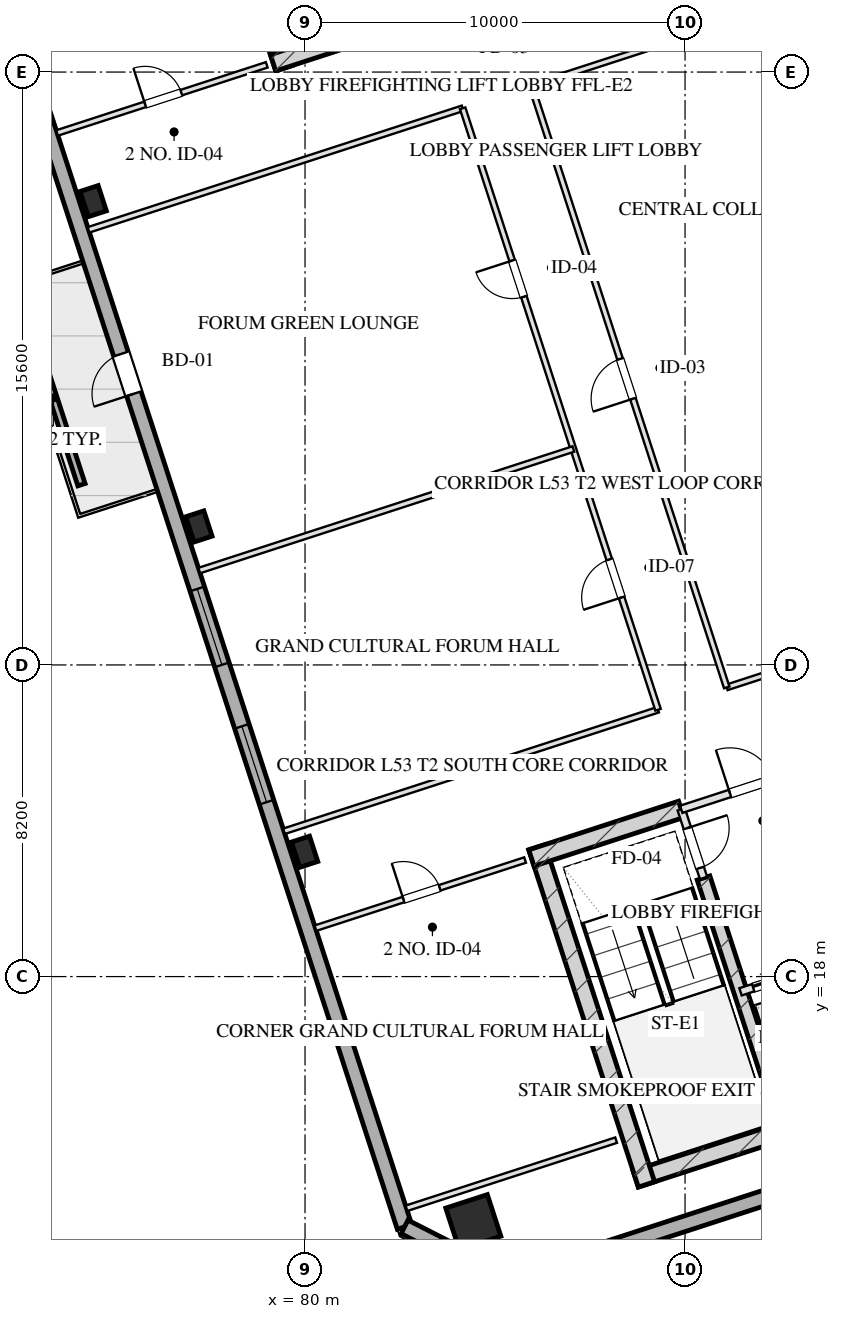
"""IFC4 building model, lengths in metres.
Left out: names, types, materials, properties, quantities, classifications, styles, units other than length and angle.
Written with IfcOpenShell. Run it as: python <this file> out.ifc"""

import sys

from ifc_helpers import new_model, si_unit, direction, frame, frame_2d, origin, origin_2d, place, context, subcontext, project, spatial, rectangle, hollow_rectangle, extrude, element, fill, save


model = new_model("IFC4")
c1 = context("Model", 3, precision=1e-05, world=origin(), true_north=direction((0.0, 1.0)))
c2 = subcontext(c1, "Body", "Model", "MODEL_VIEW")
j1 = project(units=[si_unit("LENGTHUNIT", "METRE"), si_unit("PLANEANGLEUNIT", "RADIAN")], contexts=[c1])
p1 = place(None, origin())
s1 = spatial("IfcSite", under=j1, at=p1, CompositionType="ELEMENT")
p2 = place(p1, origin())
s2 = spatial("IfcBuilding", under=s1, at=p2, CompositionType="ELEMENT")
p3 = place(p2, frame((0.0, 0.0, 198.95)))
s3 = spatial("IfcBuildingStorey", under=s2, at=p3, CompositionType="ELEMENT", Elevation=198.95)
p4 = place(p3, frame((88.701, 12.675, 0.0), z_axis=(0.0, 0.0, 1.0), x_axis=(0.95105824505, 0.309011673763, 0.0)))
e1 = element("IfcWall", 1, at=p4, inside=s3, PredefinedType="SHEAR", context=c2, shape_type="SweptSolid", body=[
    extrude(rectangle(XDim=16.25, YDim=0.45, at=frame_2d((8.125, 0.0))), origin(), (0.0, 0.0, 1.0), 3.45),
])
p5 = place(p3, frame((86.102, 21.404, 0.0), z_axis=(0.0, 0.0, 1.0), x_axis=(0.309035778627, -0.951050412717, 0.0)))
e2 = element("IfcWall", 2, at=p5, inside=s3, PredefinedType="SHEAR", context=c2, shape_type="SweptSolid", body=[
    extrude(rectangle(XDim=9.33, YDim=0.45, at=frame_2d((4.665, 0.0))), origin(), (0.0, 0.0, 1.0), 3.45),
])
p6 = place(p3, frame((90.486, 20.594, 0.0), z_axis=(0.0, 0.0, 1.0), x_axis=(0.309020428229, -0.951055400562, 0.0)))
e3 = element("IfcWall", 3, at=p6, inside=s3, PredefinedType="SHEAR", context=c2, shape_type="SweptSolid", body=[
    extrude(rectangle(XDim=6.98, YDim=0.35, at=frame_2d((3.49, 0.0))), origin(), (0.0, 0.0, 1.0), 3.45),
])
p7 = place(p3, frame((85.957, 21.12, 0.0), z_axis=(0.0, 0.0, 1.0), x_axis=(0.951064796122, 0.308991510526, 0.0)))
e4 = element("IfcWall", 4, at=p7, inside=s3, PredefinedType="SHEAR", context=c2, shape_type="SweptSolid", body=[
    extrude(rectangle(XDim=4.145, YDim=0.45, at=frame_2d((2.073, 0.0))), origin(), (0.0, 0.0, 1.0), 3.45),
])
p8 = place(p3, frame((79.442, 41.899, 0.0), z_axis=(0.0, 0.0, 1.0), x_axis=(-0.309035778627, 0.951050412717, 0.0)))
e5 = element("IfcWall", 5, at=p8, inside=s3, PredefinedType="SHEAR", context=c2, shape_type="SweptSolid", body=[
    extrude(rectangle(XDim=9.33, YDim=0.45, at=frame_2d((4.665, 0.0))), origin(), (0.0, 0.0, 1.0), 3.45),
])
p9 = place(p3, frame((79.159, 42.043, 0.0), z_axis=(0.0, 0.0, 1.0), x_axis=(0.951047485828, 0.309044785913, 0.0)))
e6 = element("IfcWall", 6, at=p9, inside=s3, PredefinedType="SHEAR", context=c2, shape_type="SweptSolid", body=[
    extrude(rectangle(XDim=4.145, YDim=0.45, at=frame_2d((2.073, 0.0))), origin(), (0.0, 0.0, 1.0), 3.45),
])
p10 = place(p3, frame((84.428, 11.539, 0.0), z_axis=(0.0, 0.0, 1.0), x_axis=(0.951056516295, 0.309016994375, 0.0)))
e7 = element("IfcColumn", 7, at=p10, inside=s3, PredefinedType="COLUMN", context=c2, shape_type="SweptSolid", body=[
    extrude(hollow_rectangle(XDim=1.15, YDim=1.15, WallThickness=0.04, at=origin_2d()), origin(), (0.0, 0.0, 1.0), 3.451),
])
for number, where, z_axis, x_axis in (
    (8, (79.99, 21.284, 0.0), (0.0, 0.0, 1.0), (0.951, 0.309, 0.0)),
    (9, (77.208, 29.844, 0.0), (0.0, 0.0, 1.0), (0.951, 0.309, 0.0)),
    (10, (74.427, 38.403, 0.0), (0.0, 0.0, 1.0), (0.951, 0.309, 0.0)),
):
    element("IfcColumn", number, at=place(p3, frame(where, z_axis=z_axis, x_axis=x_axis)), inside=s3, PredefinedType="COLUMN", context=c2, shape_type="SweptSolid", body=[
        extrude(hollow_rectangle(XDim=0.5, YDim=0.7, WallThickness=0.025, at=origin_2d()), origin(), (0.0, 0.0, 1.0), 3.451),
    ])
p11 = place(p3, frame((82.618, 11.414, 0.0), z_axis=(0.0, 0.0, 1.0), x_axis=(-0.309016491071, 0.951056679828, 0.0)))
e11 = element("IfcWall", 11, at=p11, inside=s3, PredefinedType="SOLIDWALL", context=c2, shape_type="SweptSolid", body=[
    extrude(rectangle(XDim=38.4, YDim=0.4, at=frame_2d((19.2, 0.0))), origin(), (0.0, 0.0, 1.0), 2.61),
])
p12 = place(p11, frame((11.75, 0.0, 0.75)))
e12 = element("IfcOpeningElement", 12, at=p12, cuts=e11, PredefinedType="OPENING", context=c2, shape_type="SweptSolid", body=[
    extrude(rectangle(XDim=2.1, YDim=1.46, at=frame_2d((1.05, 0.73))), frame((0.0, 0.21, 0.0), z_axis=(0.0, -1.0, 0.0), x_axis=(1.0, 0.0, 0.0)), (0.0, 0.0, 1.0), 0.42),
])
p13 = place(p11, frame((15.55, 0.0, 0.75)))
e13 = element("IfcOpeningElement", 13, at=p13, cuts=e11, PredefinedType="OPENING", context=c2, shape_type="SweptSolid", body=[
    extrude(rectangle(XDim=2.1, YDim=1.46, at=frame_2d((1.05, 0.73))), frame((0.0, 0.21, 0.0), z_axis=(0.0, -1.0, 0.0), x_axis=(1.0, 0.0, 0.0)), (0.0, 0.0, 1.0), 0.42),
])
p14 = place(p11, frame((23.05, 0.0, 0.0)))
e14 = element("IfcOpeningElement", 14, at=p14, cuts=e11, PredefinedType="OPENING", context=c2, shape_type="SweptSolid", body=[
    extrude(rectangle(XDim=1.1, YDim=2.15, at=frame_2d((0.55, 1.075))), frame((0.0, 0.21, 0.0), z_axis=(0.0, -1.0, 0.0), x_axis=(1.0, 0.0, 0.0)), (0.0, 0.0, 1.0), 0.42),
])
p15 = place(p3, frame((107.835, 17.294, 0.0), z_axis=(0.0, 0.0, 1.0), x_axis=(-0.951058012937, -0.309012388148, 0.0)))
e15 = element("IfcWall", 15, at=p15, inside=s3, PredefinedType="SOLIDWALL", context=c2, shape_type="SweptSolid", body=[
    extrude(rectangle(XDim=23.6, YDim=0.4, at=frame_2d((11.8, 0.0))), origin(), (0.0, 0.0, 1.0), 2.61),
])
p16 = place(p3, frame((85.39, 10.001, 0.0), z_axis=(0.0, 0.0, 1.0), x_axis=(-0.890979603174, 0.454043331334, 0.0)))
e16 = element("IfcWall", 16, at=p16, inside=s3, PredefinedType="SOLIDWALL", context=c2, shape_type="SweptSolid", body=[
    extrude(rectangle(XDim=3.111, YDim=0.4, at=frame_2d((1.556, 0.0))), origin(), (0.0, 0.0, 1.0), 2.61),
])
p17 = place(p3, frame((74.117, 30.942, 0.0), z_axis=(0.0, 0.0, 1.0), x_axis=(-0.308986014439, 0.951066581729, 0.0)))
e17 = element("IfcWall", 17, at=p17, inside=s3, PredefinedType="PARAPET", context=c2, shape_type="SweptSolid", body=[
    extrude(rectangle(XDim=4.8, YDim=0.2, at=frame_2d((2.4, 0.0))), origin(), (0.0, 0.0, 1.0), 0.75),
])
p18 = place(p3, frame((89.899, 22.401, 0.0), z_axis=(0.0, 0.0, 1.0), x_axis=(0.308932062672, -0.951084108086, 0.0)))
e18 = element("IfcWall", 18, at=p18, inside=s3, PredefinedType="PARTITIONING", context=c2, shape_type="SweptSolid", body=[
    extrude(rectangle(XDim=1.9, YDim=0.2, at=frame_2d((0.95, 0.0))), origin(), (0.0, 0.0, 1.0), 3.175),
])
p19 = place(p18, frame((0.52, 0.0, 0.0)))
e19 = element("IfcOpeningElement", 19, at=p19, cuts=e18, PredefinedType="OPENING", context=c2, shape_type="SweptSolid", body=[
    extrude(rectangle(XDim=1.1, YDim=2.05, at=frame_2d((0.55, 1.025))), frame((0.0, 0.11, 0.0), z_axis=(0.0, -1.0, 0.0), x_axis=(1.0, 0.0, 0.0)), (0.0, 0.0, 1.0), 0.22),
])
p20 = place(p3, frame((89.899, 22.401, 0.0), z_axis=(0.0, 0.0, 1.0), x_axis=(0.951046716504, 0.309047153403, 0.0)))
e20 = element("IfcWall", 20, at=p20, inside=s3, PredefinedType="PARTITIONING", context=c2, shape_type="SweptSolid", body=[
    extrude(rectangle(XDim=3.83, YDim=0.2, at=frame_2d((1.915, 0.0))), origin(), (0.0, 0.0, 1.0), 3.175),
])
p21 = place(p20, frame((1.35, 0.0, 0.0)))
e21 = element("IfcOpeningElement", 21, at=p21, cuts=e20, PredefinedType="OPENING", context=c2, shape_type="SweptSolid", body=[
    extrude(rectangle(XDim=1.2, YDim=2.05, at=frame_2d((0.6, 1.025))), frame((0.0, 0.11, 0.0), z_axis=(0.0, -1.0, 0.0), x_axis=(1.0, 0.0, 0.0)), (0.0, 0.0, 1.0), 0.22),
])
p22 = place(p3, frame((91.46, 17.598, 0.0), z_axis=(0.0, 0.0, 1.0), x_axis=(0.951062257173, 0.308999325213, 0.0)))
e22 = element("IfcWall", 22, at=p22, inside=s3, PredefinedType="PARTITIONING", context=c2, shape_type="SweptSolid", body=[
    extrude(rectangle(XDim=2.1, YDim=0.2, at=frame_2d((1.05, 0.0))), origin(), (0.0, 0.0, 1.0), 3.175),
])
p23 = place(p22, frame((0.35, 0.0, 0.0)))
e23 = element("IfcOpeningElement", 23, at=p23, cuts=e22, PredefinedType="OPENING", context=c2, shape_type="SweptSolid", body=[
    extrude(rectangle(XDim=1.1, YDim=2.05, at=frame_2d((0.55, 1.025))), frame((0.0, 0.11, 0.0), z_axis=(0.0, -1.0, 0.0), x_axis=(1.0, 0.0, 0.0)), (0.0, 0.0, 1.0), 0.22),
])
p24 = place(p3, frame((82.669, 11.903, 0.0), z_axis=(0.0, 0.0, 1.0), x_axis=(0.951059431056, 0.309008023519, 0.0)))
e24 = element("IfcWall", 24, at=p24, inside=s3, PredefinedType="PARTITIONING", context=c2, shape_type="SweptSolid", body=[
    extrude(rectangle(XDim=5.8, YDim=0.15, at=frame_2d((2.9, 0.0))), origin(), (0.0, 0.0, 1.0), 3.175),
])
p25 = place(p3, frame((80.275, 19.274, 0.0), z_axis=(0.0, 0.0, 1.0), x_axis=(0.951059431056, 0.309008023519, 0.0)))
e25 = element("IfcWall", 25, at=p25, inside=s3, PredefinedType="PARTITIONING", context=c2, shape_type="SweptSolid", body=[
    extrude(rectangle(XDim=5.8, YDim=0.15, at=frame_2d((2.9, 0.0))), origin(), (0.0, 0.0, 1.0), 3.175),
])
p26 = place(p25, frame((2.436, 0.0, 0.0)))
e26 = element("IfcOpeningElement", 26, at=p26, cuts=e25, PredefinedType="OPENING", context=c2, shape_type="SweptSolid", body=[
    extrude(rectangle(XDim=1.0, YDim=2.05, at=frame_2d((0.5, 1.025))), frame((0.0, 0.085, 0.0), z_axis=(0.0, -1.0, 0.0), x_axis=(1.0, 0.0, 0.0)), (0.0, 0.0, 1.0), 0.17),
])
p27 = place(p3, frame((73.476, 40.197, 0.0), z_axis=(0.0, 0.0, 1.0), x_axis=(0.951059431056, 0.309008023519, 0.0)))
e27 = element("IfcWall", 27, at=p27, inside=s3, PredefinedType="PARTITIONING", context=c2, shape_type="SweptSolid", body=[
    extrude(rectangle(XDim=5.8, YDim=0.15, at=frame_2d((2.9, 0.0))), origin(), (0.0, 0.0, 1.0), 3.175),
])
p28 = place(p27, frame((2.436, 0.0, 0.0)))
e28 = element("IfcOpeningElement", 28, at=p28, cuts=e27, PredefinedType="OPENING", context=c2, shape_type="SweptSolid", body=[
    extrude(rectangle(XDim=1.0, YDim=2.05, at=frame_2d((0.5, 1.025))), frame((0.0, 0.085, 0.0), z_axis=(0.0, -1.0, 0.0), x_axis=(1.0, 0.0, 0.0)), (0.0, 0.0, 1.0), 0.17),
])
p29 = place(p3, frame((79.447, 21.823, 0.0), z_axis=(0.0, 0.0, 1.0), x_axis=(0.951057294912, 0.309014598029, 0.0)))
e29 = element("IfcWall", 29, at=p29, inside=s3, PredefinedType="PARTITIONING", context=c2, shape_type="SweptSolid", body=[
    extrude(rectangle(XDim=10.35, YDim=0.15, at=frame_2d((5.175, 0.0))), origin(), (0.0, 0.0, 1.0), 3.175),
])
p30 = place(p3, frame((91.097, 25.608, 0.0), z_axis=(0.0, 0.0, 1.0), x_axis=(0.951053063704, 0.309027620156, 0.0)))
e30 = element("IfcWall", 30, at=p30, inside=s3, PredefinedType="PARTITIONING", context=c2, shape_type="SweptSolid", body=[
    extrude(rectangle(XDim=9.35, YDim=0.15, at=frame_2d((4.675, 0.0))), origin(), (0.0, 0.0, 1.0), 3.175),
])
p31 = place(p3, frame((74.304, 37.648, 0.0), z_axis=(0.0, 0.0, 1.0), x_axis=(0.951059547341, 0.309007665621, 0.0)))
e31 = element("IfcWall", 31, at=p31, inside=s3, PredefinedType="PARTITIONING", context=c2, shape_type="SweptSolid", body=[
    extrude(rectangle(XDim=10.35, YDim=0.15, at=frame_2d((5.175, 0.0))), origin(), (0.0, 0.0, 1.0), 3.175),
])
p32 = place(p3, frame((85.955, 41.434, 0.0), z_axis=(0.0, 0.0, 1.0), x_axis=(0.951053063704, 0.309027620156, 0.0)))
e32 = element("IfcWall", 32, at=p32, inside=s3, PredefinedType="PARTITIONING", context=c2, shape_type="SweptSolid", body=[
    extrude(rectangle(XDim=9.35, YDim=0.15, at=frame_2d((4.675, 0.0))), origin(), (0.0, 0.0, 1.0), 3.175),
])
p33 = place(p3, frame((89.29, 25.021, 0.0), z_axis=(0.0, 0.0, 1.0), x_axis=(-0.309004459387, 0.951060589068, 0.0)))
e33 = element("IfcWall", 33, at=p33, inside=s3, PredefinedType="PARTITIONING", context=c2, shape_type="SweptSolid", body=[
    extrude(rectangle(XDim=16.64, YDim=0.15, at=frame_2d((8.32, 0.0))), origin(), (0.0, 0.0, 1.0), 3.175),
])
p34 = place(p33, frame((3.107, 0.0, 0.0)))
e34 = element("IfcOpeningElement", 34, at=p34, cuts=e33, PredefinedType="OPENING", context=c2, shape_type="SweptSolid", body=[
    extrude(rectangle(XDim=1.05, YDim=2.05, at=frame_2d((0.525, 1.025))), frame((0.0, 0.085, 0.0), z_axis=(0.0, -1.0, 0.0), x_axis=(1.0, 0.0, 0.0)), (0.0, 0.0, 1.0), 0.17),
])
p35 = place(p33, frame((11.427, 0.0, 0.0)))
e35 = element("IfcOpeningElement", 35, at=p35, cuts=e33, PredefinedType="OPENING", context=c2, shape_type="SweptSolid", body=[
    extrude(rectangle(XDim=1.0, YDim=2.05, at=frame_2d((0.5, 1.025))), frame((0.0, 0.085, 0.0), z_axis=(0.0, -1.0, 0.0), x_axis=(1.0, 0.0, 0.0)), (0.0, 0.0, 1.0), 0.17),
])
p36 = place(p3, frame((91.097, 25.608, 0.0), z_axis=(0.0, 0.0, 1.0), x_axis=(-0.30901773025, 0.951056277195, 0.0)))
e36 = element("IfcWall", 36, at=p36, inside=s3, PredefinedType="PARTITIONING", context=c2, shape_type="SweptSolid", body=[
    extrude(rectangle(XDim=16.64, YDim=0.15, at=frame_2d((8.32, 0.0))), origin(), (0.0, 0.0, 1.0), 3.175),
])
p37 = place(p36, frame((7.987, 0.0, 0.0)))
e37 = element("IfcOpeningElement", 37, at=p37, cuts=e36, PredefinedType="OPENING", context=c2, shape_type="SweptSolid", body=[
    extrude(rectangle(XDim=1.1, YDim=2.05, at=frame_2d((0.55, 1.025))), frame((0.0, 0.085, 0.0), z_axis=(0.0, -1.0, 0.0), x_axis=(1.0, 0.0, 0.0)), (0.0, 0.0, 1.0), 0.17),
])
p38 = place(p3, frame((77.217, 28.684, 0.0), z_axis=(0.0, 0.0, 1.0), x_axis=(0.951059547341, 0.309007665621, 0.0)))
e38 = element("IfcWall", 38, at=p38, inside=s3, PredefinedType="PARTITIONING", context=c2, shape_type="SweptSolid", body=[
    extrude(rectangle(XDim=10.35, YDim=0.15, at=frame_2d((5.175, 0.0))), origin(), (0.0, 0.0, 1.0), 3.175),
])
p39 = place(p12, origin())
e39 = element("IfcWindow", 39, at=p39, inside=s3, PartitioningType="TRIPLE_PANEL_VERTICAL", PredefinedType="WINDOW", context=c2, shape_type="SweptSolid", body=[
    extrude(rectangle(XDim=2.1, YDim=1.46, at=frame_2d((1.05, 0.73))), frame((0.0, 0.03, 0.0), z_axis=(0.0, -1.0, 0.0), x_axis=(1.0, 0.0, 0.0)), (0.0, 0.0, 1.0), 0.06),
])
fill(e12, e39)
p40 = place(p13, origin())
e40 = element("IfcWindow", 40, at=p40, inside=s3, PartitioningType="TRIPLE_PANEL_VERTICAL", PredefinedType="WINDOW", context=c2, shape_type="SweptSolid", body=[
    extrude(rectangle(XDim=2.1, YDim=1.46, at=frame_2d((1.05, 0.73))), frame((0.0, 0.03, 0.0), z_axis=(0.0, -1.0, 0.0), x_axis=(1.0, 0.0, 0.0)), (0.0, 0.0, 1.0), 0.06),
])
fill(e13, e40)
p41 = place(p14, origin())
e41 = element("IfcDoor", 41, at=p41, inside=s3, OperationType="SINGLE_SWING_LEFT", PredefinedType="DOOR", context=c2, shape_type="SweptSolid", body=[
    extrude(rectangle(XDim=1.1, YDim=2.15, at=frame_2d((0.55, 1.075))), frame((0.0, 0.025, 0.0), z_axis=(0.0, -1.0, 0.0), x_axis=(1.0, 0.0, 0.0)), (0.0, 0.0, 1.0), 0.05),
])
fill(e14, e41)
p42 = place(p19, origin())
e42 = element("IfcDoor", 42, at=p42, inside=s3, OperationType="SINGLE_SWING_LEFT", PredefinedType="DOOR", context=c2, shape_type="SweptSolid", body=[
    extrude(rectangle(XDim=1.1, YDim=2.05, at=frame_2d((0.55, 1.025))), frame((0.0, 0.025, 0.0), z_axis=(0.0, -1.0, 0.0), x_axis=(1.0, 0.0, 0.0)), (0.0, 0.0, 1.0), 0.05),
])
fill(e19, e42)
p43 = place(p21, origin())
e43 = element("IfcDoor", 43, at=p43, inside=s3, OperationType="SINGLE_SWING_LEFT", PredefinedType="DOOR", context=c2, shape_type="SweptSolid", body=[
    extrude(rectangle(XDim=1.2, YDim=2.05, at=frame_2d((0.6, 1.025))), frame((0.0, 0.025, 0.0), z_axis=(0.0, -1.0, 0.0), x_axis=(1.0, 0.0, 0.0)), (0.0, 0.0, 1.0), 0.05),
])
fill(e21, e43)
p44 = place(p23, origin())
e44 = element("IfcDoor", 44, at=p44, inside=s3, OperationType="DOUBLE_DOOR_SLIDING", PredefinedType="DOOR", context=c2, shape_type="SweptSolid", body=[
    extrude(rectangle(XDim=1.1, YDim=2.05, at=frame_2d((0.55, 1.025))), frame((0.0, 0.025, 0.0), z_axis=(0.0, -1.0, 0.0), x_axis=(1.0, 0.0, 0.0)), (0.0, 0.0, 1.0), 0.05),
])
fill(e23, e44)
p45 = place(p26, origin())
e45 = element("IfcDoor", 45, at=p45, inside=s3, OperationType="SINGLE_SWING_LEFT", PredefinedType="DOOR", context=c2, shape_type="SweptSolid", body=[
    extrude(rectangle(XDim=1.0, YDim=2.05, at=frame_2d((0.5, 1.025))), frame((0.0, 0.025, 0.0), z_axis=(0.0, -1.0, 0.0), x_axis=(1.0, 0.0, 0.0)), (0.0, 0.0, 1.0), 0.05),
])
fill(e26, e45)
p46 = place(p28, origin())
e46 = element("IfcDoor", 46, at=p46, inside=s3, OperationType="SINGLE_SWING_LEFT", PredefinedType="DOOR", context=c2, shape_type="SweptSolid", body=[
    extrude(rectangle(XDim=1.0, YDim=2.05, at=frame_2d((0.5, 1.025))), frame((0.0, 0.025, 0.0), z_axis=(0.0, -1.0, 0.0), x_axis=(1.0, 0.0, 0.0)), (0.0, 0.0, 1.0), 0.05),
])
fill(e28, e46)
p47 = place(p34, origin())
e47 = element("IfcDoor", 47, at=p47, inside=s3, OperationType="SINGLE_SWING_LEFT", PredefinedType="DOOR", context=c2, shape_type="SweptSolid", body=[
    extrude(rectangle(XDim=1.05, YDim=2.05, at=frame_2d((0.525, 1.025))), frame((0.0, 0.025, 0.0), z_axis=(0.0, -1.0, 0.0), x_axis=(1.0, 0.0, 0.0)), (0.0, 0.0, 1.0), 0.05),
])
fill(e34, e47)
p48 = place(p35, origin())
e48 = element("IfcDoor", 48, at=p48, inside=s3, OperationType="SINGLE_SWING_RIGHT", PredefinedType="DOOR", context=c2, shape_type="SweptSolid", body=[
    extrude(rectangle(XDim=1.0, YDim=2.05, at=frame_2d((0.5, 1.025))), frame((0.0, 0.025, 0.0), z_axis=(0.0, -1.0, 0.0), x_axis=(1.0, 0.0, 0.0)), (0.0, 0.0, 1.0), 0.05),
])
fill(e35, e48)
p49 = place(p37, origin())
e49 = element("IfcDoor", 49, at=p49, inside=s3, OperationType="SINGLE_SWING_LEFT", PredefinedType="DOOR", context=c2, shape_type="SweptSolid", body=[
    extrude(rectangle(XDim=1.1, YDim=2.05, at=frame_2d((0.55, 1.025))), frame((0.0, 0.025, 0.0), z_axis=(0.0, -1.0, 0.0), x_axis=(1.0, 0.0, 0.0)), (0.0, 0.0, 1.0), 0.05),
])
fill(e37, e49)
save(model, sys.argv[1])
